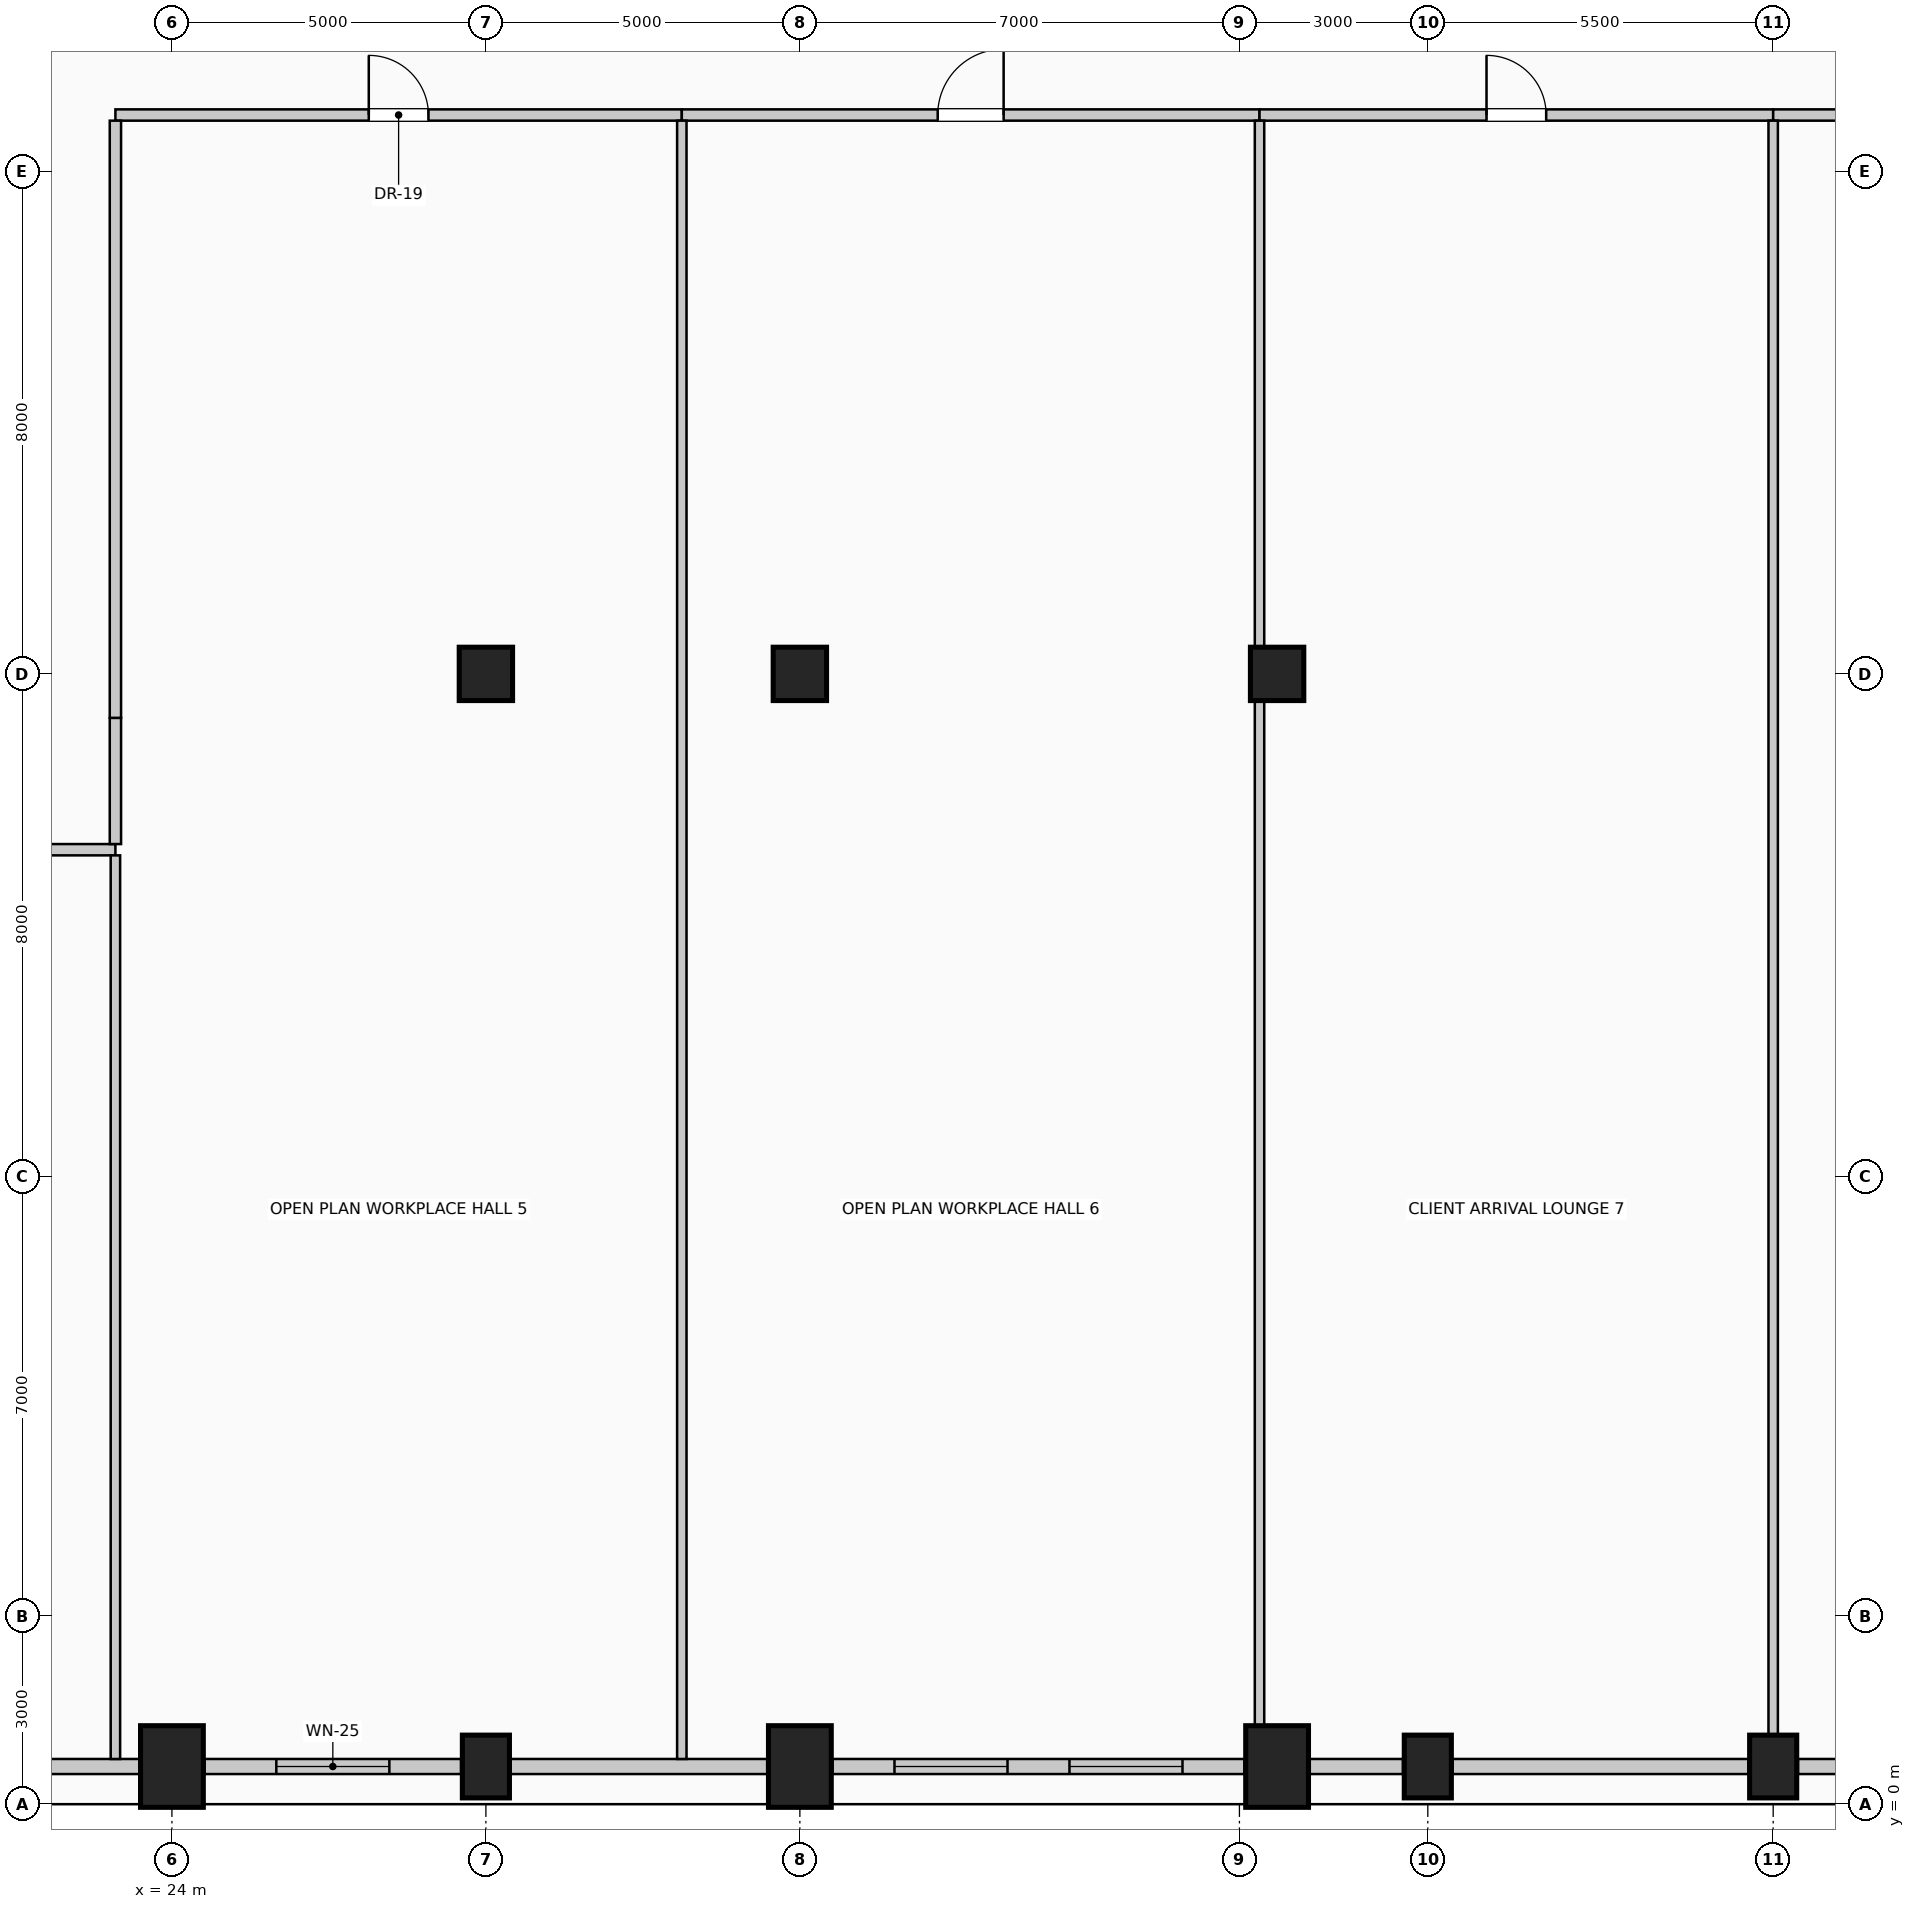
"""IFC4 building model, lengths in metres.
Left out: names, types, materials, properties, quantities, classifications, styles, units other than length and angle.
Written with IfcOpenShell. Run it as: python <this file> out.ifc"""

import sys

from ifc_helpers import new_model, si_unit, direction, frame, frame_2d, origin, origin_2d, place, context, subcontext, project, spatial, rectangle, circle, extrude, element, fill, save


model = new_model("IFC4")
c1 = context("Model", 3, precision=1e-05, world=origin(), true_north=direction((0.0, 1.0)))
c2 = subcontext(c1, "Body", "Model", "MODEL_VIEW")
j1 = project(units=[si_unit("LENGTHUNIT", "METRE"), si_unit("PLANEANGLEUNIT", "RADIAN")], contexts=[c1])
p1 = place(None, origin())
s1 = spatial("IfcSite", under=j1, at=p1, CompositionType="ELEMENT")
p2 = place(p1, origin())
s2 = spatial("IfcBuilding", under=s1, at=p2, CompositionType="ELEMENT")
p3 = place(p2, frame((0.0, 0.0, 256.6)))
s3 = spatial("IfcBuildingStorey", under=s2, at=p3, CompositionType="ELEMENT", Elevation=256.6)
p4 = place(p3, frame((24.0, 0.6, 0.0), z_axis=(0.0, 0.0, 1.0), x_axis=(1.0, 0.0, 0.0)))
e1 = element("IfcColumn", 1, at=p4, inside=s3, PredefinedType="COLUMN", context=c2, shape_type="SweptSolid", body=[
    extrude(rectangle(XDim=1.0, YDim=1.3, at=origin_2d()), origin(), (0.0, 0.0, 1.0), 4.0),
])
p5 = place(p3, frame((29.0, 0.6, 0.0), z_axis=(0.0, 0.0, 1.0), x_axis=(1.0, 0.0, 0.0)))
e2 = element("IfcColumn", 2, at=p5, inside=s3, PredefinedType="COLUMN", context=c2, shape_type="SweptSolid", body=[
    extrude(rectangle(XDim=0.75, YDim=1.0, at=origin_2d()), origin(), (0.0, 0.0, 1.0), 4.0),
])
for number, where, z_axis, x_axis in (
    (3, (34.0, 0.6, 0.0), (0.0, 0.0, 1.0), (1.0, 0.0, 0.0)),
    (4, (41.6, 0.6, 0.0), (0.0, 0.0, 1.0), (1.0, 0.0, 0.0)),
):
    element("IfcColumn", number, at=place(p3, frame(where, z_axis=z_axis, x_axis=x_axis)), inside=s3, PredefinedType="COLUMN", context=c2, shape_type="SweptSolid", body=[
        extrude(rectangle(XDim=1.0, YDim=1.3, at=origin_2d()), origin(), (0.0, 0.0, 1.0), 4.0),
    ])
for number, where, z_axis, x_axis in (
    (5, (44.0, 0.6, 0.0), (0.0, 0.0, 1.0), (1.0, 0.0, 0.0)),
    (6, (49.5, 0.6, 0.0), (0.0, 0.0, 1.0), (1.0, 0.0, 0.0)),
):
    element("IfcColumn", number, at=place(p3, frame(where, z_axis=z_axis, x_axis=x_axis)), inside=s3, PredefinedType="COLUMN", context=c2, shape_type="SweptSolid", body=[
        extrude(rectangle(XDim=0.75, YDim=1.0, at=origin_2d()), origin(), (0.0, 0.0, 1.0), 4.0),
    ])
for number, where, z_axis, x_axis in (
    (7, (29.0, 18.0, 0.0), (0.0, 0.0, 1.0), (1.0, 0.0, 0.0)),
    (8, (41.6, 18.0, 0.0), (0.0, 0.0, 1.0), (1.0, 0.0, 0.0)),
    (9, (34.0, 18.0, 0.0), (0.0, 0.0, 1.0), (1.0, 0.0, 0.0)),
):
    element("IfcColumn", number, at=place(p3, frame(where, z_axis=z_axis, x_axis=x_axis)), inside=s3, PredefinedType="COLUMN", context=c2, shape_type="SweptSolid", body=[
        extrude(circle(Radius=0.425, at=origin_2d()), origin(), (0.0, 0.0, 1.0), 4.0),
    ])
p6 = place(p3, frame((23.48, 0.6, 0.0), z_axis=(0.0, 0.0, 1.0), x_axis=(-1.0, 0.0, 0.0)))
e10 = element("IfcWall", 10, at=p6, inside=s3, PredefinedType="SOLIDWALL", context=c2, shape_type="SweptSolid", body=[
    extrude(rectangle(XDim=6.56, YDim=0.24, at=frame_2d((3.28, 0.0))), origin(), (0.0, 0.0, 1.0), 3.0),
])
p7 = place(p3, frame((28.605, 0.6, 0.0), z_axis=(0.0, 0.0, 1.0), x_axis=(-1.0, 0.0, 0.0)))
e11 = element("IfcWall", 11, at=p7, inside=s3, PredefinedType="SOLIDWALL", context=c2, shape_type="SweptSolid", body=[
    extrude(rectangle(XDim=4.085, YDim=0.24, at=frame_2d((2.042, 0.0))), origin(), (0.0, 0.0, 1.0), 3.0),
])
p8 = place(p7, frame((1.143, 0.0, 0.42)))
e12 = element("IfcOpeningElement", 12, at=p8, cuts=e11, PredefinedType="OPENING", context=c2, shape_type="SweptSolid", body=[
    extrude(rectangle(XDim=1.8, YDim=2.2, at=frame_2d((0.9, 1.1))), frame((0.0, 0.13, 0.0), z_axis=(0.0, -1.0, 0.0), x_axis=(1.0, 0.0, 0.0)), (0.0, 0.0, 1.0), 0.26),
])
p9 = place(p3, frame((33.48, 0.6, 0.0), z_axis=(0.0, 0.0, 1.0), x_axis=(-1.0, 0.0, 0.0)))
e13 = element("IfcWall", 13, at=p9, inside=s3, PredefinedType="SOLIDWALL", context=c2, shape_type="SweptSolid", body=[
    extrude(rectangle(XDim=4.085, YDim=0.24, at=frame_2d((2.042, 0.0))), origin(), (0.0, 0.0, 1.0), 3.0),
])
p10 = place(p3, frame((41.08, 0.6, 0.0), z_axis=(0.0, 0.0, 1.0), x_axis=(-1.0, 0.0, 0.0)))
e14 = element("IfcWall", 14, at=p10, inside=s3, PredefinedType="SOLIDWALL", context=c2, shape_type="SweptSolid", body=[
    extrude(rectangle(XDim=6.56, YDim=0.24, at=frame_2d((3.28, 0.0))), origin(), (0.0, 0.0, 1.0), 3.0),
])
p11 = place(p10, frame((0.987, 0.0, 0.42)))
e15 = element("IfcOpeningElement", 15, at=p11, cuts=e14, PredefinedType="OPENING", context=c2, shape_type="SweptSolid", body=[
    extrude(rectangle(XDim=1.8, YDim=2.2, at=frame_2d((0.9, 1.1))), frame((0.0, 0.13, 0.0), z_axis=(0.0, -1.0, 0.0), x_axis=(1.0, 0.0, 0.0)), (0.0, 0.0, 1.0), 0.26),
])
p12 = place(p10, frame((3.773, 0.0, 0.42)))
e16 = element("IfcOpeningElement", 16, at=p12, cuts=e14, PredefinedType="OPENING", context=c2, shape_type="SweptSolid", body=[
    extrude(rectangle(XDim=1.8, YDim=2.2, at=frame_2d((0.9, 1.1))), frame((0.0, 0.13, 0.0), z_axis=(0.0, -1.0, 0.0), x_axis=(1.0, 0.0, 0.0)), (0.0, 0.0, 1.0), 0.26),
])
p13 = place(p3, frame((43.605, 0.6, 0.0), z_axis=(0.0, 0.0, 1.0), x_axis=(-1.0, 0.0, 0.0)))
e17 = element("IfcWall", 17, at=p13, inside=s3, PredefinedType="SOLIDWALL", context=c2, shape_type="SweptSolid", body=[
    extrude(rectangle(XDim=1.485, YDim=0.24, at=frame_2d((0.742, 0.0))), origin(), (0.0, 0.0, 1.0), 3.0),
])
p14 = place(p3, frame((49.105, 0.6, 0.0), z_axis=(0.0, 0.0, 1.0), x_axis=(-1.0, 0.0, 0.0)))
e18 = element("IfcWall", 18, at=p14, inside=s3, PredefinedType="SOLIDWALL", context=c2, shape_type="SweptSolid", body=[
    extrude(rectangle(XDim=4.71, YDim=0.24, at=frame_2d((2.355, 0.0))), origin(), (0.0, 0.0, 1.0), 3.0),
])
p15 = place(p3, frame((54.005, 0.6, 0.0), z_axis=(0.0, 0.0, 1.0), x_axis=(-1.0, 0.0, 0.0)))
e19 = element("IfcWall", 19, at=p15, inside=s3, PredefinedType="SOLIDWALL", context=c2, shape_type="SweptSolid", body=[
    extrude(rectangle(XDim=4.11, YDim=0.24, at=frame_2d((2.055, 0.0))), origin(), (0.0, 0.0, 1.0), 3.0),
])
p16 = place(p15, frame((1.155, 0.0, 0.42)))
e20 = element("IfcOpeningElement", 20, at=p16, cuts=e19, PredefinedType="OPENING", context=c2, shape_type="SweptSolid", body=[
    extrude(rectangle(XDim=1.8, YDim=2.2, at=frame_2d((0.9, 1.1))), frame((0.0, 0.13, 0.0), z_axis=(0.0, -1.0, 0.0), x_axis=(1.0, 0.0, 0.0)), (0.0, 0.0, 1.0), 0.26),
])
p17 = place(p3, frame((18.72, 15.2, 0.0), z_axis=(0.0, 0.0, 1.0), x_axis=(1.0, 0.0, 0.0)))
e21 = element("IfcWall", 21, at=p17, inside=s3, PredefinedType="PARTITIONING", context=c2, shape_type="SweptSolid", body=[
    extrude(rectangle(XDim=4.38, YDim=0.18, at=frame_2d((2.19, 0.0))), origin(), (0.0, 0.0, 1.0), 3.75),
])
p18 = place(p17, frame((1.75, 0.0, 0.0)))
e22 = element("IfcOpeningElement", 22, at=p18, cuts=e21, PredefinedType="OPENING", context=c2, shape_type="SweptSolid", body=[
    extrude(rectangle(XDim=0.88, YDim=2.1, at=frame_2d((0.44, 1.05))), frame((0.0, 0.1, 0.0), z_axis=(0.0, -1.0, 0.0), x_axis=(1.0, 0.0, 0.0)), (0.0, 0.0, 1.0), 0.2),
])
p19 = place(p3, frame((23.1, 26.9, 0.0), z_axis=(0.0, 0.0, 1.0), x_axis=(1.0, 0.0, 0.0)))
e23 = element("IfcWall", 23, at=p19, inside=s3, PredefinedType="PARTITIONING", context=c2, shape_type="SweptSolid", body=[
    extrude(rectangle(XDim=9.02, YDim=0.18, at=frame_2d((4.51, 0.0))), origin(), (0.0, 0.0, 1.0), 3.75),
])
p20 = place(p19, frame((4.035, 0.0, 0.0)))
e24 = element("IfcOpeningElement", 24, at=p20, cuts=e23, PredefinedType="OPENING", context=c2, shape_type="SweptSolid", body=[
    extrude(rectangle(XDim=0.95, YDim=2.15, at=frame_2d((0.475, 1.075))), frame((0.0, 0.1, 0.0), z_axis=(0.0, -1.0, 0.0), x_axis=(1.0, 0.0, 0.0)), (0.0, 0.0, 1.0), 0.2),
])
p21 = place(p3, frame((32.12, 26.9, 0.0), z_axis=(0.0, 0.0, 1.0), x_axis=(1.0, 0.0, 0.0)))
e25 = element("IfcWall", 25, at=p21, inside=s3, PredefinedType="PARTITIONING", context=c2, shape_type="SweptSolid", body=[
    extrude(rectangle(XDim=9.2, YDim=0.18, at=frame_2d((4.6, 0.0))), origin(), (0.0, 0.0, 1.0), 3.75),
])
p22 = place(p21, frame((4.075, 0.0, 0.0)))
e26 = element("IfcOpeningElement", 26, at=p22, cuts=e25, PredefinedType="OPENING", context=c2, shape_type="SweptSolid", body=[
    extrude(rectangle(XDim=1.05, YDim=2.15, at=frame_2d((0.525, 1.075))), frame((0.0, 0.1, 0.0), z_axis=(0.0, -1.0, 0.0), x_axis=(1.0, 0.0, 0.0)), (0.0, 0.0, 1.0), 0.2),
])
p23 = place(p3, frame((41.32, 26.9, 0.0), z_axis=(0.0, 0.0, 1.0), x_axis=(1.0, 0.0, 0.0)))
e27 = element("IfcWall", 27, at=p23, inside=s3, PredefinedType="PARTITIONING", context=c2, shape_type="SweptSolid", body=[
    extrude(rectangle(XDim=8.18, YDim=0.18, at=frame_2d((4.09, 0.0))), origin(), (0.0, 0.0, 1.0), 3.75),
])
p24 = place(p23, frame((3.615, 0.0, 0.0)))
e28 = element("IfcOpeningElement", 28, at=p24, cuts=e27, PredefinedType="OPENING", context=c2, shape_type="SweptSolid", body=[
    extrude(rectangle(XDim=0.95, YDim=2.15, at=frame_2d((0.475, 1.075))), frame((0.0, 0.1, 0.0), z_axis=(0.0, -1.0, 0.0), x_axis=(1.0, 0.0, 0.0)), (0.0, 0.0, 1.0), 0.2),
])
p25 = place(p3, frame((49.5, 26.9, 0.0), z_axis=(0.0, 0.0, 1.0), x_axis=(1.0, 0.0, 0.0)))
e29 = element("IfcWall", 29, at=p25, inside=s3, PredefinedType="PARTITIONING", context=c2, shape_type="SweptSolid", body=[
    extrude(rectangle(XDim=7.78, YDim=0.18, at=frame_2d((3.89, 0.0))), origin(), (0.0, 0.0, 1.0), 3.75),
])
p26 = place(p25, frame((3.365, 0.0, 0.0)))
e30 = element("IfcOpeningElement", 30, at=p26, cuts=e29, PredefinedType="OPENING", context=c2, shape_type="SweptSolid", body=[
    extrude(rectangle(XDim=1.05, YDim=2.15, at=frame_2d((0.525, 1.075))), frame((0.0, 0.1, 0.0), z_axis=(0.0, -1.0, 0.0), x_axis=(1.0, 0.0, 0.0)), (0.0, 0.0, 1.0), 0.2),
])
p27 = place(p3, frame((23.1, 0.72, 0.0), z_axis=(0.0, 0.0, 1.0), x_axis=(0.0, 1.0, 0.0)))
e31 = element("IfcWall", 31, at=p27, inside=s3, PredefinedType="PARTITIONING", context=c2, shape_type="SweptSolid", body=[
    extrude(rectangle(XDim=14.39, YDim=0.15, at=frame_2d((7.195, 0.0))), origin(), (0.0, 0.0, 1.0), 3.75),
])
p28 = place(p3, frame((23.1, 15.29, 0.0), z_axis=(0.0, 0.0, 1.0), x_axis=(0.0, 1.0, 0.0)))
e32 = element("IfcWall", 32, at=p28, inside=s3, PredefinedType="PARTITIONING", context=c2, shape_type="SweptSolid", body=[
    extrude(rectangle(XDim=2.01, YDim=0.18, at=frame_2d((1.005, 0.0))), origin(), (0.0, 0.0, 1.0), 3.75),
])
p29 = place(p3, frame((23.1, 17.3, 0.0), z_axis=(0.0, 0.0, 1.0), x_axis=(0.0, 1.0, 0.0)))
e33 = element("IfcWall", 33, at=p29, inside=s3, PredefinedType="PARTITIONING", context=c2, shape_type="SweptSolid", body=[
    extrude(rectangle(XDim=9.51, YDim=0.18, at=frame_2d((4.755, 0.0))), origin(), (0.0, 0.0, 1.0), 3.75),
])
p30 = place(p3, frame((32.12, 0.72, 0.0), z_axis=(0.0, 0.0, 1.0), x_axis=(0.0, 1.0, 0.0)))
e34 = element("IfcWall", 34, at=p30, inside=s3, PredefinedType="PARTITIONING", context=c2, shape_type="SweptSolid", body=[
    extrude(rectangle(XDim=26.09, YDim=0.15, at=frame_2d((13.045, 0.0))), origin(), (0.0, 0.0, 1.0), 3.75),
])
p31 = place(p3, frame((41.32, 1.25, 0.0), z_axis=(0.0, 0.0, 1.0), x_axis=(0.0, 1.0, 0.0)))
e35 = element("IfcWall", 35, at=p31, inside=s3, PredefinedType="PARTITIONING", context=c2, shape_type="SweptSolid", body=[
    extrude(rectangle(XDim=16.325, YDim=0.15, at=frame_2d((8.163, 0.0))), origin(), (0.0, 0.0, 1.0), 3.195),
])
p32 = place(p3, frame((41.32, 18.425, 0.0), z_axis=(0.0, 0.0, 1.0), x_axis=(0.0, 1.0, 0.0)))
e36 = element("IfcWall", 36, at=p32, inside=s3, PredefinedType="PARTITIONING", context=c2, shape_type="SweptSolid", body=[
    extrude(rectangle(XDim=8.385, YDim=0.15, at=frame_2d((4.192, 0.0))), origin(), (0.0, 0.0, 1.0), 3.195),
])
p33 = place(p3, frame((49.5, 1.1, 0.0), z_axis=(0.0, 0.0, 1.0), x_axis=(0.0, 1.0, 0.0)))
e37 = element("IfcWall", 37, at=p33, inside=s3, PredefinedType="PARTITIONING", context=c2, shape_type="SweptSolid", body=[
    extrude(rectangle(XDim=25.71, YDim=0.15, at=frame_2d((12.855, 0.0))), origin(), (0.0, 0.0, 1.0), 3.75),
])
p34 = place(p8, origin())
e38 = element("IfcWindow", 38, at=p34, inside=s3, PartitioningType="SINGLE_PANEL", PredefinedType="WINDOW", context=c2, shape_type="SweptSolid", body=[
    extrude(rectangle(XDim=1.8, YDim=2.2, at=frame_2d((0.9, 1.1))), frame((0.0, 0.03, 0.0), z_axis=(0.0, -1.0, 0.0), x_axis=(1.0, 0.0, 0.0)), (0.0, 0.0, 1.0), 0.06),
])
fill(e12, e38)
p35 = place(p11, origin())
e39 = element("IfcWindow", 39, at=p35, inside=s3, PartitioningType="SINGLE_PANEL", PredefinedType="WINDOW", context=c2, shape_type="SweptSolid", body=[
    extrude(rectangle(XDim=1.8, YDim=2.2, at=frame_2d((0.9, 1.1))), frame((0.0, 0.03, 0.0), z_axis=(0.0, -1.0, 0.0), x_axis=(1.0, 0.0, 0.0)), (0.0, 0.0, 1.0), 0.06),
])
fill(e15, e39)
p36 = place(p12, origin())
e40 = element("IfcWindow", 40, at=p36, inside=s3, PartitioningType="SINGLE_PANEL", PredefinedType="WINDOW", context=c2, shape_type="SweptSolid", body=[
    extrude(rectangle(XDim=1.8, YDim=2.2, at=frame_2d((0.9, 1.1))), frame((0.0, 0.03, 0.0), z_axis=(0.0, -1.0, 0.0), x_axis=(1.0, 0.0, 0.0)), (0.0, 0.0, 1.0), 0.06),
])
fill(e16, e40)
p37 = place(p20, origin())
e41 = element("IfcDoor", 41, at=p37, inside=s3, OperationType="SINGLE_SWING_LEFT", PredefinedType="DOOR", context=c2, shape_type="SweptSolid", body=[
    extrude(rectangle(XDim=0.95, YDim=2.15, at=frame_2d((0.475, 1.075))), frame((0.0, 0.025, 0.0), z_axis=(0.0, -1.0, 0.0), x_axis=(1.0, 0.0, 0.0)), (0.0, 0.0, 1.0), 0.05),
])
fill(e24, e41)
p38 = place(p22, origin())
e42 = element("IfcDoor", 42, at=p38, inside=s3, OperationType="SINGLE_SWING_RIGHT", PredefinedType="DOOR", context=c2, shape_type="SweptSolid", body=[
    extrude(rectangle(XDim=1.05, YDim=2.15, at=frame_2d((0.525, 1.075))), frame((0.0, 0.025, 0.0), z_axis=(0.0, -1.0, 0.0), x_axis=(1.0, 0.0, 0.0)), (0.0, 0.0, 1.0), 0.05),
])
fill(e26, e42)
p39 = place(p24, origin())
e43 = element("IfcDoor", 43, at=p39, inside=s3, OperationType="SINGLE_SWING_LEFT", PredefinedType="DOOR", context=c2, shape_type="SweptSolid", body=[
    extrude(rectangle(XDim=0.95, YDim=2.15, at=frame_2d((0.475, 1.075))), frame((0.0, 0.025, 0.0), z_axis=(0.0, -1.0, 0.0), x_axis=(1.0, 0.0, 0.0)), (0.0, 0.0, 1.0), 0.05),
])
fill(e28, e43)
save(model, sys.argv[1])
